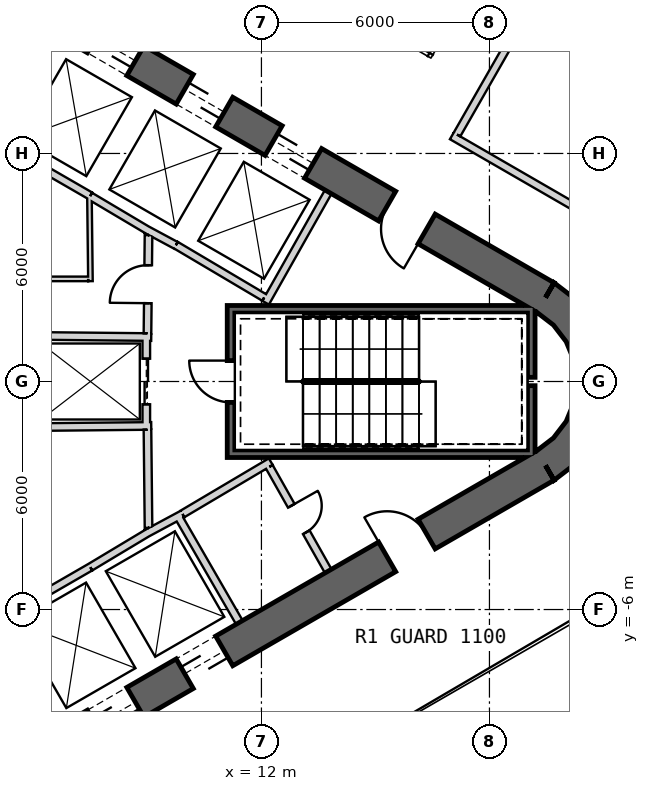
"""IFC4 building model, lengths in metres.
Left out: names, types, materials, properties, quantities, classifications, styles, units other than length and angle.
Written with IfcOpenShell. Run it as: python <this file> out.ifc"""

import sys

from ifc_helpers import new_model, si_unit, direction, frame, frame_2d, origin, place, context, subcontext, project, spatial, polyline, rectangle, outline, extrude, element, fill, save


model = new_model("IFC4")
c1 = context("Model", 3, precision=1e-05, world=origin(), true_north=direction((0.0, 1.0)))
c2 = subcontext(c1, "Body", "Model", "MODEL_VIEW")
j1 = project(units=[si_unit("LENGTHUNIT", "METRE"), si_unit("PLANEANGLEUNIT", "RADIAN")], contexts=[c1])
p1 = place(None, origin())
s1 = spatial("IfcSite", under=j1, at=p1, CompositionType="ELEMENT")
p2 = place(p1, origin())
s2 = spatial("IfcBuilding", under=s1, at=p2, CompositionType="ELEMENT")
p3 = place(p2, frame((0.0, 0.0, 21.5)))
s3 = spatial("IfcBuildingStorey", under=s2, at=p3, CompositionType="ELEMENT", Elevation=21.5)
p4 = place(p3, frame((19.475, 2.208, 0.0), z_axis=(0.0, 0.0, 1.0), x_axis=(-0.866028369851, 0.499994862586, 0.0)))
e1 = element("IfcWall", 1, at=p4, inside=s3, PredefinedType="SHEAR", context=c2, shape_type="SweptSolid", body=[
    extrude(rectangle(XDim=31.523, YDim=0.9, at=frame_2d((15.762, 0.0))), origin(), (0.0, 0.0, 1.0), 6.0),
])
p5 = place(p4, frame((7.062, 0.0, 0.0)))
e2 = element("IfcOpeningElement", 2, at=p5, cuts=e1, PredefinedType="OPENING", context=c2, shape_type="SweptSolid", body=[
    extrude(rectangle(XDim=1.2, YDim=2.4, at=frame_2d((0.6, 1.2))), frame((0.0, 0.46, 0.0), z_axis=(0.0, -1.0, 0.0), x_axis=(1.0, 0.0, 0.0)), (0.0, 0.0, 1.0), 0.92),
])
p6 = place(p4, frame((9.762, 0.0, 0.0)))
e3 = element("IfcOpeningElement", 3, at=p6, cuts=e1, PredefinedType="OPENING", context=c2, shape_type="SweptSolid", body=[
    extrude(rectangle(XDim=1.2, YDim=2.4, at=frame_2d((0.6, 1.2))), frame((0.0, 0.46, 0.0), z_axis=(0.0, -1.0, 0.0), x_axis=(1.0, 0.0, 0.0)), (0.0, 0.0, 1.0), 0.92),
])
p7 = place(p4, frame((12.462, 0.0, 0.0)))
e4 = element("IfcOpeningElement", 4, at=p7, cuts=e1, PredefinedType="OPENING", context=c2, shape_type="SweptSolid", body=[
    extrude(rectangle(XDim=1.2, YDim=2.4, at=frame_2d((0.6, 1.2))), frame((0.0, 0.46, 0.0), z_axis=(0.0, -1.0, 0.0), x_axis=(1.0, 0.0, 0.0)), (0.0, 0.0, 1.0), 0.92),
])
p8 = place(p4, frame((15.162, 0.0, 0.0)))
e5 = element("IfcOpeningElement", 5, at=p8, cuts=e1, PredefinedType="OPENING", context=c2, shape_type="SweptSolid", body=[
    extrude(rectangle(XDim=1.2, YDim=2.4, at=frame_2d((0.6, 1.2))), frame((0.0, 0.46, 0.0), z_axis=(0.0, -1.0, 0.0), x_axis=(1.0, 0.0, 0.0)), (0.0, 0.0, 1.0), 0.92),
])
p9 = place(p4, frame((17.862, 0.0, 0.0)))
e6 = element("IfcOpeningElement", 6, at=p9, cuts=e1, PredefinedType="OPENING", context=c2, shape_type="SweptSolid", body=[
    extrude(rectangle(XDim=1.2, YDim=2.4, at=frame_2d((0.6, 1.2))), frame((0.0, 0.46, 0.0), z_axis=(0.0, -1.0, 0.0), x_axis=(1.0, 0.0, 0.0)), (0.0, 0.0, 1.0), 0.92),
])
p10 = place(p4, frame((20.562, 0.0, 0.0)))
e7 = element("IfcOpeningElement", 7, at=p10, cuts=e1, PredefinedType="OPENING", context=c2, shape_type="SweptSolid", body=[
    extrude(rectangle(XDim=1.2, YDim=2.4, at=frame_2d((0.6, 1.2))), frame((0.0, 0.46, 0.0), z_axis=(0.0, -1.0, 0.0), x_axis=(1.0, 0.0, 0.0)), (0.0, 0.0, 1.0), 0.92),
])
p11 = place(p4, frame((23.262, 0.0, 0.0)))
e8 = element("IfcOpeningElement", 8, at=p11, cuts=e1, PredefinedType="OPENING", context=c2, shape_type="SweptSolid", body=[
    extrude(rectangle(XDim=1.2, YDim=2.4, at=frame_2d((0.6, 1.2))), frame((0.0, 0.46, 0.0), z_axis=(0.0, -1.0, 0.0), x_axis=(1.0, 0.0, 0.0)), (0.0, 0.0, 1.0), 0.92),
])
p12 = place(p4, frame((3.612, 0.0, 0.0)))
e9 = element("IfcOpeningElement", 9, at=p12, cuts=e1, PredefinedType="OPENING", context=c2, shape_type="SweptSolid", body=[
    extrude(rectangle(XDim=1.2, YDim=2.4, at=frame_2d((0.6, 1.2))), frame((0.0, 0.46, 0.0), z_axis=(0.0, -1.0, 0.0), x_axis=(1.0, 0.0, 0.0)), (0.0, 0.0, 1.0), 0.92),
])
p13 = place(p4, frame((26.712, 0.0, 0.0)))
e10 = element("IfcOpeningElement", 10, at=p13, cuts=e1, PredefinedType="OPENING", context=c2, shape_type="SweptSolid", body=[
    extrude(rectangle(XDim=1.2, YDim=2.4, at=frame_2d((0.6, 1.2))), frame((0.0, 0.46, 0.0), z_axis=(0.0, -1.0, 0.0), x_axis=(1.0, 0.0, 0.0)), (0.0, 0.0, 1.0), 0.92),
])
p14 = place(p3, frame((-7.825, -17.97, 0.0), z_axis=(0.0, 0.0, 1.0), x_axis=(0.866028369851, 0.499994862586, 0.0)))
e11 = element("IfcWall", 11, at=p14, inside=s3, PredefinedType="SHEAR", context=c2, shape_type="SweptSolid", body=[
    extrude(rectangle(XDim=31.523, YDim=0.9, at=frame_2d((15.762, 0.0))), origin(), (0.0, 0.0, 1.0), 6.0),
])
p15 = place(p14, frame((7.062, 0.0, 0.0)))
e12 = element("IfcOpeningElement", 12, at=p15, cuts=e11, PredefinedType="OPENING", context=c2, shape_type="SweptSolid", body=[
    extrude(rectangle(XDim=1.2, YDim=2.4, at=frame_2d((0.6, 1.2))), frame((0.0, 0.46, 0.0), z_axis=(0.0, -1.0, 0.0), x_axis=(1.0, 0.0, 0.0)), (0.0, 0.0, 1.0), 0.92),
])
p16 = place(p14, frame((9.762, 0.0, 0.0)))
e13 = element("IfcOpeningElement", 13, at=p16, cuts=e11, PredefinedType="OPENING", context=c2, shape_type="SweptSolid", body=[
    extrude(rectangle(XDim=1.2, YDim=2.4, at=frame_2d((0.6, 1.2))), frame((0.0, 0.46, 0.0), z_axis=(0.0, -1.0, 0.0), x_axis=(1.0, 0.0, 0.0)), (0.0, 0.0, 1.0), 0.92),
])
p17 = place(p14, frame((12.462, 0.0, 0.0)))
e14 = element("IfcOpeningElement", 14, at=p17, cuts=e11, PredefinedType="OPENING", context=c2, shape_type="SweptSolid", body=[
    extrude(rectangle(XDim=1.2, YDim=2.4, at=frame_2d((0.6, 1.2))), frame((0.0, 0.46, 0.0), z_axis=(0.0, -1.0, 0.0), x_axis=(1.0, 0.0, 0.0)), (0.0, 0.0, 1.0), 0.92),
])
p18 = place(p14, frame((15.162, 0.0, 0.0)))
e15 = element("IfcOpeningElement", 15, at=p18, cuts=e11, PredefinedType="OPENING", context=c2, shape_type="SweptSolid", body=[
    extrude(rectangle(XDim=1.2, YDim=2.4, at=frame_2d((0.6, 1.2))), frame((0.0, 0.46, 0.0), z_axis=(0.0, -1.0, 0.0), x_axis=(1.0, 0.0, 0.0)), (0.0, 0.0, 1.0), 0.92),
])
p19 = place(p14, frame((17.862, 0.0, 0.0)))
e16 = element("IfcOpeningElement", 16, at=p19, cuts=e11, PredefinedType="OPENING", context=c2, shape_type="SweptSolid", body=[
    extrude(rectangle(XDim=1.2, YDim=2.4, at=frame_2d((0.6, 1.2))), frame((0.0, 0.46, 0.0), z_axis=(0.0, -1.0, 0.0), x_axis=(1.0, 0.0, 0.0)), (0.0, 0.0, 1.0), 0.92),
])
p20 = place(p14, frame((20.562, 0.0, 0.0)))
e17 = element("IfcOpeningElement", 17, at=p20, cuts=e11, PredefinedType="OPENING", context=c2, shape_type="SweptSolid", body=[
    extrude(rectangle(XDim=1.2, YDim=2.4, at=frame_2d((0.6, 1.2))), frame((0.0, 0.46, 0.0), z_axis=(0.0, -1.0, 0.0), x_axis=(1.0, 0.0, 0.0)), (0.0, 0.0, 1.0), 0.92),
])
p21 = place(p14, frame((26.712, 0.0, 0.0)))
e18 = element("IfcOpeningElement", 18, at=p21, cuts=e11, PredefinedType="OPENING", context=c2, shape_type="SweptSolid", body=[
    extrude(rectangle(XDim=1.2, YDim=2.4, at=frame_2d((0.6, 1.2))), frame((0.0, 0.46, 0.0), z_axis=(0.0, -1.0, 0.0), x_axis=(1.0, 0.0, 0.0)), (0.0, 0.0, 1.0), 0.92),
])
p22 = place(p14, frame((3.612, 0.0, 0.0)))
e19 = element("IfcOpeningElement", 19, at=p22, cuts=e11, PredefinedType="OPENING", context=c2, shape_type="SweptSolid", body=[
    extrude(rectangle(XDim=1.2, YDim=2.4, at=frame_2d((0.6, 1.2))), frame((0.0, 0.46, 0.0), z_axis=(0.0, -1.0, 0.0), x_axis=(1.0, 0.0, 0.0)), (0.0, 0.0, 1.0), 0.92),
])
p23 = place(p3, origin())
e20 = element("IfcWall", 20, at=p23, inside=s3, PredefinedType="SHEAR", context=c2, shape_type="SweptSolid", body=[
    extrude(outline(polyline([(19.7, -2.598), (20.321, -2.121), (20.798, -1.5), (21.098, -0.777), (21.2, 0.0), (21.098, 0.777), (20.798, 1.5), (20.321, 2.121), (19.7, 2.598), (19.25, 1.819), (19.685, 1.485), (20.019, 1.05), (20.229, 0.543), (20.3, 0.0), (20.229, -0.543), (20.019, -1.05), (19.685, -1.485), (19.25, -1.819), (19.7, -2.598)])), origin(), (0.0, 0.0, 1.0), 6.0),
])
p24 = place(p3, frame((7.497, 4.886, 0.0), z_axis=(0.0, 0.0, 1.0), x_axis=(-0.866030989016, 0.499990325971, 0.0)))
e21 = element("IfcWall", 21, at=p24, inside=s3, PredefinedType="PLUMBINGWALL", context=c2, shape_type="SweptSolid", body=[
    extrude(rectangle(XDim=8.1, YDim=0.2, at=frame_2d((4.05, 0.0))), origin(), (0.0, 0.0, 1.0), 5.7),
])
p25 = place(p3, frame((12.11, 2.073, 0.0), z_axis=(0.0, 0.0, 1.0), x_axis=(0.49196600604, 0.870614408852, 0.0)))
e22 = element("IfcWall", 22, at=p25, inside=s3, PredefinedType="PLUMBINGWALL", context=c2, shape_type="SweptSolid", body=[
    extrude(rectangle(XDim=3.35, YDim=0.2, at=frame_2d((1.675, 0.0))), origin(), (0.0, 0.0, 1.0), 5.7),
])
p26 = place(p3, frame((12.073, 2.211, 0.0), z_axis=(0.0, 0.0, 1.0), x_axis=(-0.860438357912, 0.509554542943, 0.0)))
e23 = element("IfcWall", 23, at=p26, inside=s3, PredefinedType="PLUMBINGWALL", context=c2, shape_type="SweptSolid", body=[
    extrude(rectangle(XDim=2.7, YDim=0.2, at=frame_2d((1.35, 0.0))), origin(), (0.0, 0.0, 1.0), 5.7),
])
p27 = place(p3, frame((9.748, 3.583, 0.0), z_axis=(0.0, 0.0, 1.0), x_axis=(-0.880917147855, 0.473270513147, 0.0)))
e24 = element("IfcWall", 24, at=p27, inside=s3, PredefinedType="PLUMBINGWALL", context=c2, shape_type="SweptSolid", body=[
    extrude(rectangle(XDim=0.878, YDim=0.2, at=frame_2d((0.439, 0.0))), origin(), (0.0, 0.0, 1.0), 5.7),
])
p28 = place(p3, frame((9.08, 3.937, 0.0), z_axis=(0.0, 0.0, 1.0), x_axis=(-0.859981807212, 0.510324691999, 0.0)))
e25 = element("IfcWall", 25, at=p28, inside=s3, PredefinedType="PLUMBINGWALL", context=c2, shape_type="SweptSolid", body=[
    extrude(rectangle(XDim=1.845, YDim=0.2, at=frame_2d((0.922, 0.0))), origin(), (0.0, 0.0, 1.0), 5.7),
])
p29 = place(p3, frame((0.483, -8.936, 0.0), z_axis=(0.0, 0.0, 1.0), x_axis=(0.866030989016, 0.499990325971, 0.0)))
e26 = element("IfcWall", 26, at=p29, inside=s3, PredefinedType="PLUMBINGWALL", context=c2, shape_type="SweptSolid", body=[
    extrude(rectangle(XDim=8.1, YDim=0.2, at=frame_2d((4.05, 0.0))), origin(), (0.0, 0.0, 1.0), 5.7),
])
p30 = place(p3, frame((9.795, -3.525, 0.0), z_axis=(0.0, 0.0, 1.0), x_axis=(0.499984717929, -0.866034226713, 0.0)))
e27 = element("IfcWall", 27, at=p30, inside=s3, PredefinedType="PLUMBINGWALL", context=c2, shape_type="SweptSolid", body=[
    extrude(rectangle(XDim=3.25, YDim=0.2, at=frame_2d((1.625, 0.0))), origin(), (0.0, 0.0, 1.0), 5.7),
])
p31 = place(p3, frame((8.974, -3.999, 0.0), z_axis=(0.0, 0.0, 1.0), x_axis=(0.880907015104, 0.473289373154, 0.0)))
e28 = element("IfcWall", 28, at=p31, inside=s3, PredefinedType="PLUMBINGWALL", context=c2, shape_type="SweptSolid", body=[
    extrude(rectangle(XDim=1.078, YDim=0.2, at=frame_2d((0.539, 0.0))), origin(), (0.0, 0.0, 1.0), 5.7),
])
p32 = place(p3, frame((7.497, -4.886, 0.0), z_axis=(0.0, 0.0, 1.0), x_axis=(0.857516281273, 0.51445682749, 0.0)))
e29 = element("IfcWall", 29, at=p32, inside=s3, PredefinedType="PLUMBINGWALL", context=c2, shape_type="SweptSolid", body=[
    extrude(rectangle(XDim=1.845, YDim=0.2, at=frame_2d((0.922, 0.0))), origin(), (0.0, 0.0, 1.0), 5.7),
])
p33 = place(p3, frame((19.2, 1.9, -0.3), z_axis=(0.0, 0.0, 1.0), x_axis=(-1.0, 0.0, 0.0)))
e30 = element("IfcWall", 30, at=p33, inside=s3, PredefinedType="SHEAR", context=c2, shape_type="SweptSolid", body=[
    extrude(rectangle(XDim=8.1, YDim=0.2, at=frame_2d((4.05, 0.0))), origin(), (0.0, 0.0, 1.0), 6.0),
])
p34 = place(p3, frame((19.1, -2.0, -0.3), z_axis=(0.0, 0.0, 1.0), x_axis=(0.0, 1.0, 0.0)))
e31 = element("IfcWall", 31, at=p34, inside=s3, PredefinedType="SHEAR", context=c2, shape_type="SweptSolid", body=[
    extrude(rectangle(XDim=1.89, YDim=0.2, at=frame_2d((0.945, 0.0))), origin(), (0.0, 0.0, 1.0), 6.0),
])
p35 = place(p3, frame((19.1, 0.11, -0.3), z_axis=(0.0, 0.0, 1.0), x_axis=(0.0, 1.0, 0.0)))
e32 = element("IfcWall", 32, at=p35, inside=s3, PredefinedType="SHEAR", context=c2, shape_type="SweptSolid", body=[
    extrude(rectangle(XDim=1.69, YDim=0.2, at=frame_2d((0.845, 0.0))), origin(), (0.0, 0.0, 1.0), 6.0),
])
p36 = place(p3, frame((11.1, -1.9, -0.3), z_axis=(0.0, 0.0, 1.0), x_axis=(1.0, 0.0, 0.0)))
e33 = element("IfcWall", 33, at=p36, inside=s3, PredefinedType="SHEAR", context=c2, shape_type="SweptSolid", body=[
    extrude(rectangle(XDim=7.9, YDim=0.2, at=frame_2d((3.95, 0.0))), origin(), (0.0, 0.0, 1.0), 6.0),
])
p37 = place(p3, frame((11.2, -1.8, -0.3), z_axis=(0.0, 0.0, 1.0), x_axis=(0.0, 1.0, 0.0)))
e34 = element("IfcWall", 34, at=p37, inside=s3, PredefinedType="SHEAR", context=c2, shape_type="SweptSolid", body=[
    extrude(rectangle(XDim=3.6, YDim=0.2, at=frame_2d((1.8, 0.0))), origin(), (0.0, 0.0, 1.0), 6.0),
])
p38 = place(p37, frame((1.25, 0.0, 0.3)))
e35 = element("IfcOpeningElement", 35, at=p38, cuts=e34, PredefinedType="OPENING", context=c2, shape_type="SweptSolid", body=[
    extrude(rectangle(XDim=1.1, YDim=2.1, at=frame_2d((0.55, 1.05))), frame((0.0, 0.11, 0.0), z_axis=(0.0, -1.0, 0.0), x_axis=(1.0, 0.0, 0.0)), (0.0, 0.0, 1.0), 0.22),
])
p39 = place(p3, frame((8.97, 1.2, 0.0), z_axis=(0.0, 0.0, 1.0), x_axis=(0.0, -1.0, 0.0)))
e36 = element("IfcWall", 36, at=p39, inside=s3, PredefinedType="PLUMBINGWALL", context=c2, shape_type="SweptSolid", body=[
    extrude(rectangle(XDim=2.4, YDim=0.2, at=frame_2d((1.2, 0.0))), origin(), (0.0, 0.0, 1.0), 5.7),
])
p40 = place(p39, frame((0.6, 0.0, 0.0)))
e37 = element("IfcOpeningElement", 37, at=p40, cuts=e36, PredefinedType="OPENING", context=c2, shape_type="SweptSolid", body=[
    extrude(rectangle(XDim=1.2, YDim=2.4, at=frame_2d((0.6, 1.2))), frame((0.0, 0.11, 0.0), z_axis=(0.0, -1.0, 0.0), x_axis=(1.0, 0.0, 0.0)), (0.0, 0.0, 1.0), 0.22),
])
p41 = place(p3, frame((9.1, -1.169, 0.0), z_axis=(0.0, 0.0, 1.0), x_axis=(-0.999949988, -0.010001074852, 0.0)))
e38 = element("IfcWall", 38, at=p41, inside=s3, PredefinedType="PLUMBINGWALL", context=c2, shape_type="SweptSolid", body=[
    extrude(rectangle(XDim=3.1, YDim=0.2, at=frame_2d((1.55, 0.0))), origin(), (0.0, 0.0, 1.0), 5.7),
])
p42 = place(p3, frame((9.1, 1.169, 0.0), z_axis=(0.0, 0.0, 1.0), x_axis=(-0.99994990606, 0.010009264196, 0.0)))
e39 = element("IfcWall", 39, at=p42, inside=s3, PredefinedType="PLUMBINGWALL", context=c2, shape_type="SweptSolid", body=[
    extrude(rectangle(XDim=3.0, YDim=0.2, at=frame_2d((1.5, 0.0))), origin(), (0.0, 0.0, 1.0), 5.7),
])
p43 = place(p3, frame((12.245, -2.109, 0.0), z_axis=(0.0, 0.0, 1.0), x_axis=(-0.860414880418, -0.509594185166, 0.0)))
e40 = element("IfcWall", 40, at=p43, inside=s3, PredefinedType="PARTITIONING", context=c2, shape_type="SweptSolid", body=[
    extrude(rectangle(XDim=2.7, YDim=0.2, at=frame_2d((1.35, 0.0))), origin(), (0.0, 0.0, 1.0), 5.7),
])
p44 = place(p3, frame((13.758, -4.99, 0.0), z_axis=(0.0, 0.0, 1.0), x_axis=(-0.491993409184, 0.87059892334, 0.0)))
e41 = element("IfcWall", 41, at=p44, inside=s3, PredefinedType="PARTITIONING", context=c2, shape_type="SweptSolid", body=[
    extrude(rectangle(XDim=3.15, YDim=0.2, at=frame_2d((1.575, 0.0))), origin(), (0.0, 0.0, 1.0), 5.7),
])
p45 = place(p44, frame((1.175, 0.0, 0.0)))
e42 = element("IfcOpeningElement", 42, at=p45, cuts=e41, PredefinedType="OPENING", context=c2, shape_type="SweptSolid", body=[
    extrude(rectangle(XDim=0.8, YDim=2.1, at=frame_2d((0.4, 1.05))), frame((0.0, 0.11, 0.0), z_axis=(0.0, -1.0, 0.0), x_axis=(1.0, 0.0, 0.0)), (0.0, 0.0, 1.0), 0.22),
])
p46 = place(p3, frame((9.029, -3.851, 0.0), z_axis=(0.0, 0.0, 1.0), x_axis=(-0.010784614026, 0.999941844359, 0.0)))
e43 = element("IfcWall", 43, at=p46, inside=s3, PredefinedType="PARTITIONING", context=c2, shape_type="SweptSolid", body=[
    extrude(rectangle(XDim=2.581, YDim=0.2, at=frame_2d((1.291, 0.0))), origin(), (0.0, 0.0, 1.0), 5.7),
])
p47 = place(p3, frame((9.001, 1.27, 0.0), z_axis=(0.0, 0.0, 1.0), x_axis=(0.010783593937, 0.99994185536, 0.0)))
e44 = element("IfcWall", 44, at=p47, inside=s3, PredefinedType="PARTITIONING", context=c2, shape_type="SweptSolid", body=[
    extrude(rectangle(XDim=2.581, YDim=0.2, at=frame_2d((1.291, 0.0))), origin(), (0.0, 0.0, 1.0), 5.7),
])
p48 = place(p47, frame((0.791, 0.0, 0.0)))
e45 = element("IfcOpeningElement", 45, at=p48, cuts=e44, PredefinedType="OPENING", context=c2, shape_type="SweptSolid", body=[
    extrude(rectangle(XDim=1.0, YDim=2.1, at=frame_2d((0.5, 1.05))), frame((0.0, 0.11, 0.0), z_axis=(0.0, -1.0, 0.0), x_axis=(1.0, 0.0, 0.0)), (0.0, 0.0, 1.0), 0.22),
])
p49 = place(p3, frame((7.501, 2.64, 0.0), z_axis=(0.0, 0.0, 1.0), x_axis=(-0.01174194727, 0.999931060961, 0.0)))
e46 = element("IfcWall", 46, at=p49, inside=s3, PredefinedType="PARTITIONING", context=c2, shape_type="SweptSolid", body=[
    extrude(rectangle(XDim=2.225, YDim=0.12, at=frame_2d((1.112, 0.0))), origin(), (0.0, 0.0, 1.0), 5.7),
])
p50 = place(p3, frame((4.44, 2.7, 0.0), z_axis=(0.0, 0.0, 1.0), x_axis=(1.0, 0.0, 0.0)))
e47 = element("IfcWall", 47, at=p50, inside=s3, PredefinedType="PARTITIONING", context=c2, shape_type="SweptSolid", body=[
    extrude(rectangle(XDim=3.0, YDim=0.12, at=frame_2d((1.5, 0.0))), origin(), (0.0, 0.0, 1.0), 5.7),
])
p51 = place(p50, frame((1.13, 0.0, 0.0)))
e48 = element("IfcOpeningElement", 48, at=p51, cuts=e47, PredefinedType="OPENING", context=c2, shape_type="SweptSolid", body=[
    extrude(rectangle(XDim=0.8, YDim=2.1, at=frame_2d((0.4, 1.05))), frame((0.0, 0.07, 0.0), z_axis=(0.0, -1.0, 0.0), x_axis=(1.0, 0.0, 0.0)), (0.0, 0.0, 1.0), 0.14),
])
p52 = place(p3, frame((21.161, 4.064, 0.0), z_axis=(0.0, 0.0, 1.0), x_axis=(-0.865926843533, 0.500170672519, 0.0)))
e49 = element("IfcWall", 49, at=p52, inside=s3, PredefinedType="PARTITIONING", context=c2, shape_type="SweptSolid", body=[
    extrude(rectangle(XDim=4.793, YDim=0.2, at=frame_2d((2.396, 0.0))), origin(), (0.0, 0.0, 1.0), 4.88),
])
p53 = place(p3, frame((17.146, 6.499, 0.0), z_axis=(0.0, 0.0, 1.0), x_axis=(0.496772917321, 0.867880561262, 0.0)))
e50 = element("IfcWall", 50, at=p53, inside=s3, PredefinedType="PARTITIONING", context=c2, shape_type="SweptSolid", body=[
    extrude(rectangle(XDim=8.002, YDim=0.2, at=frame_2d((4.001, 0.0))), origin(), (0.0, 0.0, 1.0), 5.17),
])
p54 = place(p53, frame((3.499, 0.0, 0.0)))
e51 = element("IfcOpeningElement", 51, at=p54, cuts=e50, PredefinedType="OPENING", context=c2, shape_type="SweptSolid", body=[
    extrude(rectangle(XDim=1.0, YDim=2.1, at=frame_2d((0.5, 1.05))), frame((0.0, 0.11, 0.0), z_axis=(0.0, -1.0, 0.0), x_axis=(1.0, 0.0, 0.0)), (0.0, 0.0, 1.0), 0.22),
])
p55 = place(p38, origin())
e52 = element("IfcDoor", 52, at=p55, inside=s3, OperationType="SINGLE_SWING_RIGHT", PredefinedType="USERDEFINED", context=c2, shape_type="SweptSolid", body=[
    extrude(rectangle(XDim=1.1, YDim=2.1, at=frame_2d((0.55, 1.05))), frame((0.0, 0.025, 0.0), z_axis=(0.0, -1.0, 0.0), x_axis=(1.0, 0.0, 0.0)), (0.0, 0.0, 1.0), 0.05),
])
fill(e35, e52)
p56 = place(p48, origin())
e53 = element("IfcDoor", 53, at=p56, inside=s3, OperationType="SINGLE_SWING_LEFT", PredefinedType="USERDEFINED", context=c2, shape_type="SweptSolid", body=[
    extrude(rectangle(XDim=1.0, YDim=2.1, at=frame_2d((0.5, 1.05))), frame((0.0, 0.025, 0.0), z_axis=(0.0, -1.0, 0.0), x_axis=(1.0, 0.0, 0.0)), (0.0, 0.0, 1.0), 0.05),
])
fill(e45, e53)
p57 = place(p40, origin())
e54 = element("IfcDoor", 54, at=p57, inside=s3, OperationType="SLIDING_TO_LEFT", PredefinedType="USERDEFINED", context=c2, shape_type="SweptSolid", body=[
    extrude(rectangle(XDim=1.2, YDim=2.4, at=frame_2d((0.6, 1.2))), frame((0.0, 0.025, 0.0), z_axis=(0.0, -1.0, 0.0), x_axis=(1.0, 0.0, 0.0)), (0.0, 0.0, 1.0), 0.05),
])
fill(e37, e54)
p58 = place(p45, origin())
e55 = element("IfcDoor", 55, at=p58, inside=s3, OperationType="SINGLE_SWING_RIGHT", PredefinedType="USERDEFINED", context=c2, shape_type="SweptSolid", body=[
    extrude(rectangle(XDim=0.8, YDim=2.1, at=frame_2d((0.4, 1.05))), frame((0.0, 0.025, 0.0), z_axis=(0.0, -1.0, 0.0), x_axis=(1.0, 0.0, 0.0)), (0.0, 0.0, 1.0), 0.05),
])
fill(e42, e55)
p59 = place(p5, origin())
e56 = element("IfcDoor", 56, at=p59, inside=s3, OperationType="SLIDING_TO_LEFT", PredefinedType="USERDEFINED", context=c2, shape_type="SweptSolid", body=[
    extrude(rectangle(XDim=1.2, YDim=2.4, at=frame_2d((0.6, 1.2))), frame((0.0, 0.025, 0.0), z_axis=(0.0, -1.0, 0.0), x_axis=(1.0, 0.0, 0.0)), (0.0, 0.0, 1.0), 0.05),
])
fill(e2, e56)
p60 = place(p6, origin())
e57 = element("IfcDoor", 57, at=p60, inside=s3, OperationType="SLIDING_TO_LEFT", PredefinedType="USERDEFINED", context=c2, shape_type="SweptSolid", body=[
    extrude(rectangle(XDim=1.2, YDim=2.4, at=frame_2d((0.6, 1.2))), frame((0.0, 0.025, 0.0), z_axis=(0.0, -1.0, 0.0), x_axis=(1.0, 0.0, 0.0)), (0.0, 0.0, 1.0), 0.05),
])
fill(e3, e57)
p61 = place(p7, origin())
e58 = element("IfcDoor", 58, at=p61, inside=s3, OperationType="SLIDING_TO_LEFT", PredefinedType="USERDEFINED", context=c2, shape_type="SweptSolid", body=[
    extrude(rectangle(XDim=1.2, YDim=2.4, at=frame_2d((0.6, 1.2))), frame((0.0, 0.025, 0.0), z_axis=(0.0, -1.0, 0.0), x_axis=(1.0, 0.0, 0.0)), (0.0, 0.0, 1.0), 0.05),
])
fill(e4, e58)
p62 = place(p19, origin())
e59 = element("IfcDoor", 59, at=p62, inside=s3, OperationType="SLIDING_TO_LEFT", PredefinedType="USERDEFINED", context=c2, shape_type="SweptSolid", body=[
    extrude(rectangle(XDim=1.2, YDim=2.4, at=frame_2d((0.6, 1.2))), frame((0.0, 0.025, 0.0), z_axis=(0.0, -1.0, 0.0), x_axis=(1.0, 0.0, 0.0)), (0.0, 0.0, 1.0), 0.05),
])
fill(e16, e59)
p63 = place(p20, origin())
e60 = element("IfcDoor", 60, at=p63, inside=s3, OperationType="SLIDING_TO_LEFT", PredefinedType="USERDEFINED", context=c2, shape_type="SweptSolid", body=[
    extrude(rectangle(XDim=1.2, YDim=2.4, at=frame_2d((0.6, 1.2))), frame((0.0, 0.025, 0.0), z_axis=(0.0, -1.0, 0.0), x_axis=(1.0, 0.0, 0.0)), (0.0, 0.0, 1.0), 0.05),
])
fill(e17, e60)
p64 = place(p21, origin())
e61 = element("IfcDoor", 61, at=p64, inside=s3, OperationType="SINGLE_SWING_LEFT", PredefinedType="USERDEFINED", context=c2, shape_type="SweptSolid", body=[
    extrude(rectangle(XDim=1.2, YDim=2.4, at=frame_2d((0.6, 1.2))), frame((0.0, 0.025, 0.0), z_axis=(0.0, -1.0, 0.0), x_axis=(1.0, 0.0, 0.0)), (0.0, 0.0, 1.0), 0.05),
])
fill(e18, e61)
p65 = place(p12, origin())
e62 = element("IfcDoor", 62, at=p65, inside=s3, OperationType="SINGLE_SWING_LEFT", PredefinedType="USERDEFINED", context=c2, shape_type="SweptSolid", body=[
    extrude(rectangle(XDim=1.2, YDim=2.4, at=frame_2d((0.6, 1.2))), frame((0.0, 0.025, 0.0), z_axis=(0.0, -1.0, 0.0), x_axis=(1.0, 0.0, 0.0)), (0.0, 0.0, 1.0), 0.05),
])
fill(e9, e62)
save(model, sys.argv[1])
